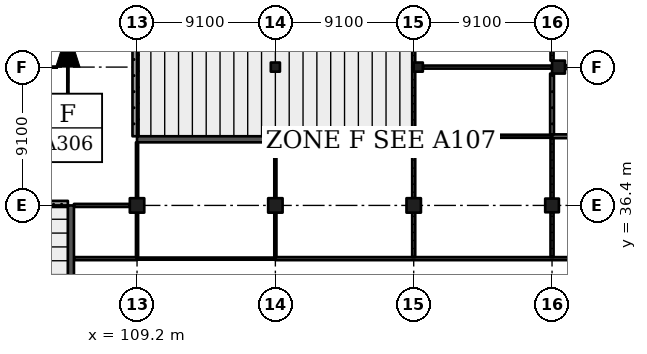
"""IFC4 building model, lengths in metres.
Left out: names, types, materials, properties, quantities, classifications, styles, units other than length and angle.
Written with IfcOpenShell. Run it as: python <this file> out.ifc"""

import sys

from ifc_helpers import new_model, si_unit, direction, frame, frame_2d, origin, origin_2d, place, context, subcontext, project, spatial, rectangle, extrude, element, fill, save


model = new_model("IFC4")
c1 = context("Model", 3, precision=1e-05, world=origin(), true_north=direction((0.0, 1.0)))
c2 = subcontext(c1, "Body", "Model", "MODEL_VIEW")
j1 = project(units=[si_unit("LENGTHUNIT", "METRE"), si_unit("PLANEANGLEUNIT", "RADIAN")], contexts=[c1])
p1 = place(None, origin())
s1 = spatial("IfcSite", under=j1, at=p1, CompositionType="ELEMENT")
p2 = place(p1, origin())
s2 = spatial("IfcBuilding", under=s1, at=p2, CompositionType="ELEMENT")
p3 = place(p2, origin())
s3 = spatial("IfcBuildingStorey", under=s2, at=p3, CompositionType="ELEMENT", Elevation=0.0)
for number, where, z_axis, x_axis in (
    (1, (109.2, 36.4, -0.4), (0.0, 0.0, 1.0), (1.0, 0.0, 0.0)),
    (2, (118.3, 36.4, -0.4), (0.0, 0.0, 1.0), (1.0, 0.0, 0.0)),
):
    element("IfcColumn", number, at=place(p3, frame(where, z_axis=z_axis, x_axis=x_axis)), inside=s3, PredefinedType="COLUMN", context=c2, shape_type="SweptSolid", body=[
        extrude(rectangle(XDim=0.95, YDim=0.95, at=origin_2d()), origin(), (0.0, 0.0, 1.0), 6.77),
    ])
p4 = place(p3, frame((118.3, 45.5, -0.4), z_axis=(0.0, 0.0, 1.0), x_axis=(1.0, 0.0, 0.0)))
e3 = element("IfcColumn", 3, at=p4, inside=s3, PredefinedType="COLUMN", context=c2, shape_type="SweptSolid", body=[
    extrude(rectangle(XDim=0.6, YDim=0.6, at=origin_2d()), origin(), (0.0, 0.0, 1.0), 2.133),
])
p5 = place(p3, frame((127.4, 36.4, -0.4), z_axis=(0.0, 0.0, 1.0), x_axis=(1.0, 0.0, 0.0)))
e4 = element("IfcColumn", 4, at=p5, inside=s3, PredefinedType="COLUMN", context=c2, shape_type="SweptSolid", body=[
    extrude(rectangle(XDim=0.95, YDim=0.95, at=origin_2d()), origin(), (0.0, 0.0, 1.0), 6.77),
])
p6 = place(p3, frame((127.7, 45.5, -0.4), z_axis=(0.0, 0.0, 1.0), x_axis=(1.0, 0.0, 0.0)))
e5 = element("IfcColumn", 5, at=p6, inside=s3, PredefinedType="COLUMN", context=c2, shape_type="SweptSolid", body=[
    extrude(rectangle(XDim=0.6, YDim=0.6, at=origin_2d()), origin(), (0.0, 0.0, 1.0), 6.77),
])
p7 = place(p3, frame((136.5, 36.4, -0.4), z_axis=(0.0, 0.0, 1.0), x_axis=(1.0, 0.0, 0.0)))
e6 = element("IfcColumn", 6, at=p7, inside=s3, PredefinedType="COLUMN", context=c2, shape_type="SweptSolid", body=[
    extrude(rectangle(XDim=0.9, YDim=0.9, at=origin_2d()), origin(), (0.0, 0.0, 1.0), 6.77),
])
p8 = place(p3, frame((136.925, 45.5, -0.4), z_axis=(0.0, 0.0, 1.0), x_axis=(1.0, 0.0, 0.0)))
e7 = element("IfcColumn", 7, at=p8, inside=s3, PredefinedType="COLUMN", context=c2, shape_type="SweptSolid", body=[
    extrude(rectangle(XDim=0.85, YDim=0.85, at=origin_2d()), origin(), (0.0, 0.0, 1.0), 6.77),
])
p9 = place(p3, frame((40.95, 36.55, -0.4), z_axis=(0.0, 0.0, 1.0), x_axis=(1.0, 0.0, 0.0)))
e8 = element("IfcWall", 8, at=p9, inside=s3, PredefinedType="SOLIDWALL", context=c2, shape_type="SweptSolid", body=[
    extrude(rectangle(XDim=63.7, YDim=0.3, at=frame_2d((31.85, 0.0))), origin(), (0.0, 0.0, 1.0), 1.45),
])
p10 = place(p3, frame((109.05, 40.95, -0.4), z_axis=(0.0, 0.0, 1.0), x_axis=(0.0, 1.0, 0.0)))
e9 = element("IfcWall", 9, at=p10, inside=s3, PredefinedType="SOLIDWALL", context=c2, shape_type="SweptSolid", body=[
    extrude(rectangle(XDim=27.3, YDim=0.3, at=frame_2d((13.65, 0.0))), origin(), (0.0, 0.0, 1.0), 1.45),
])
for number, where, z_axis, x_axis in (
    (10, (104.85, 36.4, -0.4), (0.0, 0.0, 1.0), (0.0, -1.0, 0.0)),
    (11, (109.2, 40.75, -0.4), (0.0, 0.0, 1.0), (1.0, 0.0, 0.0)),
):
    element("IfcWall", number, at=place(p3, frame(where, z_axis=z_axis, x_axis=x_axis)), inside=s3, PredefinedType="SHEAR", context=c2, shape_type="SweptSolid", body=[
        extrude(rectangle(XDim=18.2, YDim=0.4, at=frame_2d((9.1, 0.0))), origin(), (0.0, 0.0, 1.0), 6.77),
    ])
p11 = place(p3, frame((105.05, 32.9, 0.0), z_axis=(0.0, 0.0, 1.0), x_axis=(1.0, 0.0, 0.0)))
e12 = element("IfcWall", 12, at=p11, inside=s3, PredefinedType="PARTITIONING", context=c2, shape_type="SweptSolid", body=[
    extrude(rectangle(XDim=4.15, YDim=0.2, at=frame_2d((2.075, 0.0))), origin(), (0.0, 0.0, 1.0), 6.02),
])
p12 = place(p11, frame((0.85, 0.0, 0.0)))
e13 = element("IfcOpeningElement", 13, at=p12, cuts=e12, PredefinedType="OPENING", context=c2, shape_type="SweptSolid", body=[
    extrude(rectangle(XDim=2.4, YDim=2.4, at=frame_2d((1.2, 1.2))), frame((0.0, 0.11, 0.0), z_axis=(0.0, -1.0, 0.0), x_axis=(1.0, 0.0, 0.0)), (0.0, 0.0, 1.0), 0.22),
])
p13 = place(p3, frame((105.05, 36.4, 0.0), z_axis=(0.0, 0.0, 1.0), x_axis=(1.0, 0.0, 0.0)))
e14 = element("IfcWall", 14, at=p13, inside=s3, PredefinedType="PARTITIONING", context=c2, shape_type="SweptSolid", body=[
    extrude(rectangle(XDim=3.675, YDim=0.2, at=frame_2d((1.837, 0.0))), origin(), (0.0, 0.0, 1.0), 6.02),
])
p14 = place(p13, frame((0.65, 0.0, 0.0)))
e15 = element("IfcOpeningElement", 15, at=p14, cuts=e14, PredefinedType="OPENING", context=c2, shape_type="SweptSolid", body=[
    extrude(rectangle(XDim=2.4, YDim=2.4, at=frame_2d((1.2, 1.2))), frame((0.0, 0.11, 0.0), z_axis=(0.0, -1.0, 0.0), x_axis=(1.0, 0.0, 0.0)), (0.0, 0.0, 1.0), 0.22),
])
p15 = place(p3, frame((109.2, 33.0, 0.0), z_axis=(0.0, 0.0, 1.0), x_axis=(0.0, 1.0, 0.0)))
e16 = element("IfcWall", 16, at=p15, inside=s3, PredefinedType="SOLIDWALL", context=c2, shape_type="SweptSolid", body=[
    extrude(rectangle(XDim=2.925, YDim=0.14, at=frame_2d((1.462, 0.0))), origin(), (0.0, 0.0, 1.0), 5.32),
])
p16 = place(p3, frame((109.2, 36.875, 0.0), z_axis=(0.0, 0.0, 1.0), x_axis=(0.0, 1.0, 0.0)))
e17 = element("IfcWall", 17, at=p16, inside=s3, PredefinedType="SOLIDWALL", context=c2, shape_type="SweptSolid", body=[
    extrude(rectangle(XDim=3.675, YDim=0.14, at=frame_2d((1.837, 0.0))), origin(), (0.0, 0.0, 1.0), 6.02),
])
p17 = place(p3, frame((118.3, 32.9, 0.0), z_axis=(0.0, 0.0, 1.0), x_axis=(-1.0, 0.0, 0.0)))
e18 = element("IfcWall", 18, at=p17, inside=s3, PredefinedType="SOLIDWALL", context=c2, shape_type="SweptSolid", body=[
    extrude(rectangle(XDim=9.1, YDim=0.14, at=frame_2d((4.55, 0.0))), origin(), (0.0, 0.0, 1.0), 6.02),
])
p18 = place(p17, frame((3.75, 0.0, 0.0)))
e19 = element("IfcOpeningElement", 19, at=p18, cuts=e18, PredefinedType="OPENING", context=c2, shape_type="SweptSolid", body=[
    extrude(rectangle(XDim=1.5, YDim=2.1, at=frame_2d((0.75, 1.05))), frame((0.0, 0.08, 0.0), z_axis=(0.0, -1.0, 0.0), x_axis=(1.0, 0.0, 0.0)), (0.0, 0.0, 1.0), 0.16),
])
p19 = place(p3, frame((118.3, 33.0, 0.0), z_axis=(0.0, 0.0, 1.0), x_axis=(0.0, 1.0, 0.0)))
e20 = element("IfcWall", 20, at=p19, inside=s3, PredefinedType="SOLIDWALL", context=c2, shape_type="SweptSolid", body=[
    extrude(rectangle(XDim=2.925, YDim=0.14, at=frame_2d((1.462, 0.0))), origin(), (0.0, 0.0, 1.0), 5.32),
])
p20 = place(p3, frame((118.3, 36.875, 0.0), z_axis=(0.0, 0.0, 1.0), x_axis=(0.0, 1.0, 0.0)))
e21 = element("IfcWall", 21, at=p20, inside=s3, PredefinedType="SOLIDWALL", context=c2, shape_type="SweptSolid", body=[
    extrude(rectangle(XDim=3.675, YDim=0.14, at=frame_2d((1.837, 0.0))), origin(), (0.0, 0.0, 1.0), 6.02),
])
p21 = place(p3, frame((127.3, 40.95, 0.0), z_axis=(0.0, 0.0, 1.0), x_axis=(1.0, 0.0, 0.0)))
e22 = element("IfcWall", 22, at=p21, inside=s3, PredefinedType="PARTITIONING", context=c2, shape_type="SweptSolid", body=[
    extrude(rectangle(XDim=9.2, YDim=0.2, at=frame_2d((4.6, 0.0))), origin(), (0.0, 0.0, 1.0), 6.02),
])
p22 = place(p21, frame((0.75, 0.0, 0.0)))
e23 = element("IfcOpeningElement", 23, at=p22, cuts=e22, PredefinedType="OPENING", context=c2, shape_type="SweptSolid", body=[
    extrude(rectangle(XDim=3.0, YDim=2.4, at=frame_2d((1.5, 1.2))), frame((0.0, 0.11, 0.0), z_axis=(0.0, -1.0, 0.0), x_axis=(1.0, 0.0, 0.0)), (0.0, 0.0, 1.0), 0.22),
])
p23 = place(p21, frame((5.35, 0.0, 0.0)))
e24 = element("IfcOpeningElement", 24, at=p23, cuts=e22, PredefinedType="OPENING", context=c2, shape_type="SweptSolid", body=[
    extrude(rectangle(XDim=3.0, YDim=2.4, at=frame_2d((1.5, 1.2))), frame((0.0, 0.11, 0.0), z_axis=(0.0, -1.0, 0.0), x_axis=(1.0, 0.0, 0.0)), (0.0, 0.0, 1.0), 0.22),
])
p24 = place(p3, frame((118.3, 32.9, 0.0), z_axis=(0.0, 0.0, 1.0), x_axis=(1.0, 0.0, 0.0)))
e25 = element("IfcWall", 25, at=p24, inside=s3, PredefinedType="PARTITIONING", context=c2, shape_type="SweptSolid", body=[
    extrude(rectangle(XDim=27.1, YDim=0.2, at=frame_2d((13.55, 0.0))), origin(), (0.0, 0.0, 1.0), 6.02),
])
p25 = place(p24, frame((22.15, 0.0, 0.0)))
e26 = element("IfcOpeningElement", 26, at=p25, cuts=e25, PredefinedType="OPENING", context=c2, shape_type="SweptSolid", body=[
    extrude(rectangle(XDim=1.1, YDim=2.1, at=frame_2d((0.55, 1.05))), frame((0.0, 0.11, 0.0), z_axis=(0.0, -1.0, 0.0), x_axis=(1.0, 0.0, 0.0)), (0.0, 0.0, 1.0), 0.22),
])
p26 = place(p24, frame((3.95, 0.0, 0.0)))
e27 = element("IfcOpeningElement", 27, at=p26, cuts=e25, PredefinedType="OPENING", context=c2, shape_type="SweptSolid", body=[
    extrude(rectangle(XDim=1.1, YDim=2.1, at=frame_2d((0.55, 1.05))), frame((0.0, 0.11, 0.0), z_axis=(0.0, -1.0, 0.0), x_axis=(1.0, 0.0, 0.0)), (0.0, 0.0, 1.0), 0.22),
])
p27 = place(p24, frame((10.15, 0.0, 0.0)))
e28 = element("IfcOpeningElement", 28, at=p27, cuts=e25, PredefinedType="OPENING", context=c2, shape_type="SweptSolid", body=[
    extrude(rectangle(XDim=2.4, YDim=2.4, at=frame_2d((1.2, 1.2))), frame((0.0, 0.11, 0.0), z_axis=(0.0, -1.0, 0.0), x_axis=(1.0, 0.0, 0.0)), (0.0, 0.0, 1.0), 0.22),
])
p28 = place(p24, frame((14.75, 0.0, 0.0)))
e29 = element("IfcOpeningElement", 29, at=p28, cuts=e25, PredefinedType="OPENING", context=c2, shape_type="SweptSolid", body=[
    extrude(rectangle(XDim=2.4, YDim=2.4, at=frame_2d((1.2, 1.2))), frame((0.0, 0.11, 0.0), z_axis=(0.0, -1.0, 0.0), x_axis=(1.0, 0.0, 0.0)), (0.0, 0.0, 1.0), 0.22),
])
p29 = place(p3, frame((127.4, 35.925, 0.0), z_axis=(0.0, 0.0, 1.0), x_axis=(0.0, -1.0, 0.0)))
e30 = element("IfcWall", 30, at=p29, inside=s3, PredefinedType="PARTITIONING", context=c2, shape_type="SweptSolid", body=[
    extrude(rectangle(XDim=2.925, YDim=0.2, at=frame_2d((1.462, 0.0))), origin(), (0.0, 0.0, 1.0), 5.32),
])
p30 = place(p3, frame((127.4, 40.55, 0.0), z_axis=(0.0, 0.0, 1.0), x_axis=(0.0, -1.0, 0.0)))
e31 = element("IfcWall", 31, at=p30, inside=s3, PredefinedType="PARTITIONING", context=c2, shape_type="SweptSolid", body=[
    extrude(rectangle(XDim=3.675, YDim=0.2, at=frame_2d((1.837, 0.0))), origin(), (0.0, 0.0, 1.0), 5.02),
])
p31 = place(p3, frame((127.4, 41.05, 0.0), z_axis=(0.0, 0.0, 1.0), x_axis=(0.0, 1.0, 0.0)))
e32 = element("IfcWall", 32, at=p31, inside=s3, PredefinedType="PARTITIONING", context=c2, shape_type="SweptSolid", body=[
    extrude(rectangle(XDim=4.45, YDim=0.2, at=frame_2d((2.225, 0.0))), origin(), (0.0, 0.0, 1.0), 5.02),
])
p32 = place(p3, frame((127.4, 45.5, 0.0), z_axis=(0.0, 0.0, 1.0), x_axis=(0.0, 1.0, 0.0)))
e33 = element("IfcWall", 33, at=p32, inside=s3, PredefinedType="PARTITIONING", context=c2, shape_type="SweptSolid", body=[
    extrude(rectangle(XDim=8.8, YDim=0.2, at=frame_2d((4.4, 0.0))), origin(), (0.0, 0.0, 1.0), 5.02),
])
p33 = place(p3, frame((136.5, 33.0, 0.0), z_axis=(0.0, 0.0, 1.0), x_axis=(0.0, 1.0, 0.0)))
e34 = element("IfcWall", 34, at=p33, inside=s3, PredefinedType="PARTITIONING", context=c2, shape_type="SweptSolid", body=[
    extrude(rectangle(XDim=2.95, YDim=0.2, at=frame_2d((1.475, 0.0))), origin(), (0.0, 0.0, 1.0), 5.32),
])
p34 = place(p3, frame((136.5, 36.85, 0.0), z_axis=(0.0, 0.0, 1.0), x_axis=(0.0, 1.0, 0.0)))
e35 = element("IfcWall", 35, at=p34, inside=s3, PredefinedType="PARTITIONING", context=c2, shape_type="SweptSolid", body=[
    extrude(rectangle(XDim=3.975, YDim=0.2, at=frame_2d((1.987, 0.0))), origin(), (0.0, 0.0, 1.0), 5.32),
])
p35 = place(p3, frame((136.5, 40.95, 0.0), z_axis=(0.0, 0.0, 1.0), x_axis=(1.0, 0.0, 0.0)))
e36 = element("IfcWall", 36, at=p35, inside=s3, PredefinedType="SOLIDWALL", context=c2, shape_type="SweptSolid", body=[
    extrude(rectangle(XDim=8.95, YDim=0.25, at=frame_2d((4.475, 0.0))), origin(), (0.0, 0.0, 1.0), 6.02),
])
p36 = place(p3, frame((136.5, 45.075, 0.0), z_axis=(0.0, 0.0, 1.0), x_axis=(0.0, -1.0, 0.0)))
e37 = element("IfcWall", 37, at=p36, inside=s3, PredefinedType="SOLIDWALL", context=c2, shape_type="SweptSolid", body=[
    extrude(rectangle(XDim=4.0, YDim=0.25, at=frame_2d((2.0, 0.0))), origin(), (0.0, 0.0, 1.0), 5.32),
])
p37 = place(p36, frame((1.55, 0.0, 0.0)))
e38 = element("IfcOpeningElement", 38, at=p37, cuts=e37, PredefinedType="OPENING", context=c2, shape_type="SweptSolid", body=[
    extrude(rectangle(XDim=0.8, YDim=2.1, at=frame_2d((0.4, 1.05))), frame((0.0, 0.135, 0.0), z_axis=(0.0, -1.0, 0.0), x_axis=(1.0, 0.0, 0.0)), (0.0, 0.0, 1.0), 0.27),
])
p38 = place(p3, frame((136.5, 45.5, 0.0), z_axis=(0.0, 0.0, 1.0), x_axis=(-1.0, 0.0, 0.0)))
e39 = element("IfcWall", 39, at=p38, inside=s3, PredefinedType="PARTITIONING", context=c2, shape_type="SweptSolid", body=[
    extrude(rectangle(XDim=8.5, YDim=0.2, at=frame_2d((4.25, 0.0))), origin(), (0.0, 0.0, 1.0), 5.27),
])
p39 = place(p38, frame((0.65, 0.0, 0.0)))
e40 = element("IfcOpeningElement", 40, at=p39, cuts=e39, PredefinedType="OPENING", context=c2, shape_type="SweptSolid", body=[
    extrude(rectangle(XDim=3.0, YDim=2.4, at=frame_2d((1.5, 1.2))), frame((0.0, 0.11, 0.0), z_axis=(0.0, -1.0, 0.0), x_axis=(1.0, 0.0, 0.0)), (0.0, 0.0, 1.0), 0.22),
])
p40 = place(p38, frame((4.85, 0.0, 0.0)))
e41 = element("IfcOpeningElement", 41, at=p40, cuts=e39, PredefinedType="OPENING", context=c2, shape_type="SweptSolid", body=[
    extrude(rectangle(XDim=3.0, YDim=2.4, at=frame_2d((1.5, 1.2))), frame((0.0, 0.11, 0.0), z_axis=(0.0, -1.0, 0.0), x_axis=(1.0, 0.0, 0.0)), (0.0, 0.0, 1.0), 0.22),
])
p41 = place(p3, frame((136.5, 54.175, 0.0), z_axis=(0.0, 0.0, 1.0), x_axis=(0.0, -1.0, 0.0)))
e42 = element("IfcWall", 42, at=p41, inside=s3, PredefinedType="PARTITIONING", context=c2, shape_type="SweptSolid", body=[
    extrude(rectangle(XDim=8.25, YDim=0.2, at=frame_2d((4.125, 0.0))), origin(), (0.0, 0.0, 1.0), 5.32),
])
p42 = place(p41, frame((1.15, 0.0, 0.0)))
e43 = element("IfcOpeningElement", 43, at=p42, cuts=e42, PredefinedType="OPENING", context=c2, shape_type="SweptSolid", body=[
    extrude(rectangle(XDim=1.8, YDim=2.4, at=frame_2d((0.9, 1.2))), frame((0.0, 0.11, 0.0), z_axis=(0.0, -1.0, 0.0), x_axis=(1.0, 0.0, 0.0)), (0.0, 0.0, 1.0), 0.22),
])
p43 = place(p41, frame((5.25, 0.0, 0.0)))
e44 = element("IfcOpeningElement", 44, at=p43, cuts=e42, PredefinedType="OPENING", context=c2, shape_type="SweptSolid", body=[
    extrude(rectangle(XDim=1.8, YDim=2.4, at=frame_2d((0.9, 1.2))), frame((0.0, 0.11, 0.0), z_axis=(0.0, -1.0, 0.0), x_axis=(1.0, 0.0, 0.0)), (0.0, 0.0, 1.0), 0.22),
])
p44 = place(p41, frame((3.45, 0.0, 0.0)))
e45 = element("IfcOpeningElement", 45, at=p44, cuts=e42, PredefinedType="OPENING", context=c2, shape_type="SweptSolid", body=[
    extrude(rectangle(XDim=1.8, YDim=2.4, at=frame_2d((0.9, 1.2))), frame((0.0, 0.11, 0.0), z_axis=(0.0, -1.0, 0.0), x_axis=(1.0, 0.0, 0.0)), (0.0, 0.0, 1.0), 0.22),
])
p45 = place(p3, frame((137.35, 45.5, 0.0), z_axis=(0.0, 0.0, 1.0), x_axis=(1.0, 0.0, 0.0)))
e46 = element("IfcWall", 46, at=p45, inside=s3, PredefinedType="SOLIDWALL", context=c2, shape_type="SweptSolid", body=[
    extrude(rectangle(XDim=7.95, YDim=0.25, at=frame_2d((3.975, 0.0))), origin(), (0.0, 0.0, 1.0), 5.32),
])
p46 = place(p26, origin())
e47 = element("IfcDoor", 47, at=p46, inside=s3, OperationType="SINGLE_SWING_RIGHT", PredefinedType="DOOR", context=c2, shape_type="SweptSolid", body=[
    extrude(rectangle(XDim=1.1, YDim=2.1, at=frame_2d((0.55, 1.05))), frame((0.0, 0.025, 0.0), z_axis=(0.0, -1.0, 0.0), x_axis=(1.0, 0.0, 0.0)), (0.0, 0.0, 1.0), 0.05),
])
fill(e27, e47)
p47 = place(p18, origin())
e48 = element("IfcDoor", 48, at=p47, inside=s3, OperationType="DOUBLE_DOOR_SINGLE_SWING", PredefinedType="DOOR", context=c2, shape_type="SweptSolid", body=[
    extrude(rectangle(XDim=1.5, YDim=2.1, at=frame_2d((0.75, 1.05))), frame((0.0, 0.025, 0.0), z_axis=(0.0, -1.0, 0.0), x_axis=(1.0, 0.0, 0.0)), (0.0, 0.0, 1.0), 0.05),
])
fill(e19, e48)
p48 = place(p37, origin())
e49 = element("IfcDoor", 49, at=p48, inside=s3, OperationType="SINGLE_SWING_RIGHT", PredefinedType="DOOR", context=c2, shape_type="SweptSolid", body=[
    extrude(rectangle(XDim=0.8, YDim=2.1, at=frame_2d((0.4, 1.05))), frame((0.0, 0.025, 0.0), z_axis=(0.0, -1.0, 0.0), x_axis=(1.0, 0.0, 0.0)), (0.0, 0.0, 1.0), 0.05),
])
fill(e38, e49)
p49 = place(p27, origin())
e50 = element("IfcDoor", 50, at=p49, inside=s3, OperationType="DOUBLE_DOOR_SINGLE_SWING", PredefinedType="DOOR", context=c2, shape_type="SweptSolid", body=[
    extrude(rectangle(XDim=2.4, YDim=2.4, at=frame_2d((1.2, 1.2))), frame((0.0, 0.025, 0.0), z_axis=(0.0, -1.0, 0.0), x_axis=(1.0, 0.0, 0.0)), (0.0, 0.0, 1.0), 0.05),
])
fill(e28, e50)
p50 = place(p28, origin())
e51 = element("IfcDoor", 51, at=p50, inside=s3, OperationType="DOUBLE_DOOR_SINGLE_SWING", PredefinedType="DOOR", context=c2, shape_type="SweptSolid", body=[
    extrude(rectangle(XDim=2.4, YDim=2.4, at=frame_2d((1.2, 1.2))), frame((0.0, 0.025, 0.0), z_axis=(0.0, -1.0, 0.0), x_axis=(1.0, 0.0, 0.0)), (0.0, 0.0, 1.0), 0.05),
])
fill(e29, e51)
p51 = place(p12, origin())
e52 = element("IfcDoor", 52, at=p51, inside=s3, OperationType="DOUBLE_DOOR_SINGLE_SWING", PredefinedType="DOOR", context=c2, shape_type="SweptSolid", body=[
    extrude(rectangle(XDim=2.4, YDim=2.4, at=frame_2d((1.2, 1.2))), frame((0.0, 0.025, 0.0), z_axis=(0.0, -1.0, 0.0), x_axis=(1.0, 0.0, 0.0)), (0.0, 0.0, 1.0), 0.05),
])
fill(e13, e52)
p52 = place(p14, origin())
e53 = element("IfcDoor", 53, at=p52, inside=s3, OperationType="DOUBLE_DOOR_SINGLE_SWING", PredefinedType="DOOR", context=c2, shape_type="SweptSolid", body=[
    extrude(rectangle(XDim=2.4, YDim=2.4, at=frame_2d((1.2, 1.2))), frame((0.0, 0.025, 0.0), z_axis=(0.0, -1.0, 0.0), x_axis=(1.0, 0.0, 0.0)), (0.0, 0.0, 1.0), 0.05),
])
fill(e15, e53)
p53 = place(p22, origin())
e54 = element("IfcDoor", 54, at=p53, inside=s3, OperationType="DOUBLE_DOOR_SINGLE_SWING", PredefinedType="DOOR", context=c2, shape_type="SweptSolid", body=[
    extrude(rectangle(XDim=3.0, YDim=2.4, at=frame_2d((1.5, 1.2))), frame((0.0, 0.025, 0.0), z_axis=(0.0, -1.0, 0.0), x_axis=(1.0, 0.0, 0.0)), (0.0, 0.0, 1.0), 0.05),
])
fill(e23, e54)
p54 = place(p23, origin())
e55 = element("IfcDoor", 55, at=p54, inside=s3, OperationType="DOUBLE_DOOR_SINGLE_SWING", PredefinedType="DOOR", context=c2, shape_type="SweptSolid", body=[
    extrude(rectangle(XDim=3.0, YDim=2.4, at=frame_2d((1.5, 1.2))), frame((0.0, 0.025, 0.0), z_axis=(0.0, -1.0, 0.0), x_axis=(1.0, 0.0, 0.0)), (0.0, 0.0, 1.0), 0.05),
])
fill(e24, e55)
p55 = place(p39, origin())
e56 = element("IfcDoor", 56, at=p55, inside=s3, OperationType="DOUBLE_DOOR_SINGLE_SWING", PredefinedType="DOOR", context=c2, shape_type="SweptSolid", body=[
    extrude(rectangle(XDim=3.0, YDim=2.4, at=frame_2d((1.5, 1.2))), frame((0.0, 0.025, 0.0), z_axis=(0.0, -1.0, 0.0), x_axis=(1.0, 0.0, 0.0)), (0.0, 0.0, 1.0), 0.05),
])
fill(e40, e56)
p56 = place(p40, origin())
e57 = element("IfcDoor", 57, at=p56, inside=s3, OperationType="DOUBLE_DOOR_SINGLE_SWING", PredefinedType="DOOR", context=c2, shape_type="SweptSolid", body=[
    extrude(rectangle(XDim=3.0, YDim=2.4, at=frame_2d((1.5, 1.2))), frame((0.0, 0.025, 0.0), z_axis=(0.0, -1.0, 0.0), x_axis=(1.0, 0.0, 0.0)), (0.0, 0.0, 1.0), 0.05),
])
fill(e41, e57)
save(model, sys.argv[1])
